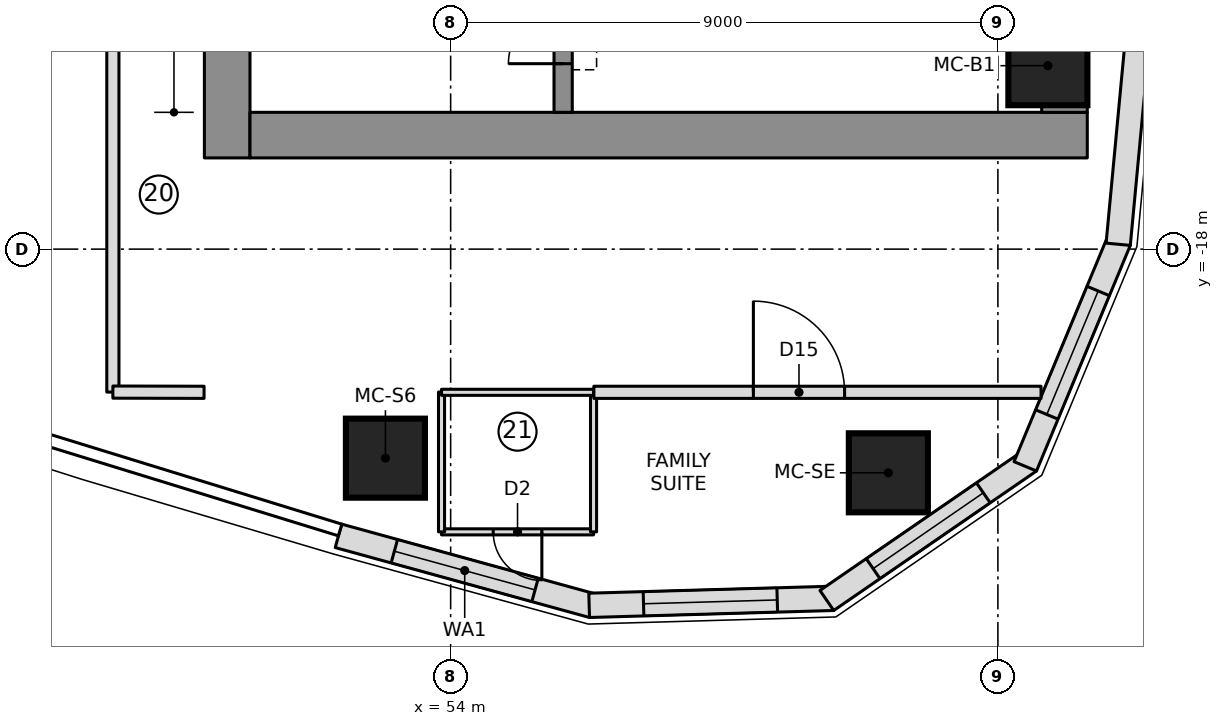
"""IFC4 building model, lengths in metres.
Left out: names, types, materials, properties, quantities, classifications, styles, units other than length and angle.
Written with IfcOpenShell. Run it as: python <this file> out.ifc"""

import sys

from ifc_helpers import new_model, si_unit, direction, frame, frame_2d, origin, origin_2d, place, context, subcontext, project, spatial, polyline, rectangle, outline, extrude, element, fill, save


model = new_model("IFC4")
c1 = context("Model", 3, precision=1e-05, world=origin(), true_north=direction((0.0, 1.0)))
c2 = subcontext(c1, "Body", "Model", "MODEL_VIEW")
j1 = project(units=[si_unit("LENGTHUNIT", "METRE"), si_unit("PLANEANGLEUNIT", "RADIAN")], contexts=[c1])
p1 = place(None, origin())
s1 = spatial("IfcSite", under=j1, at=p1, CompositionType="ELEMENT")
p2 = place(p1, origin())
s2 = spatial("IfcBuilding", under=s1, at=p2, CompositionType="ELEMENT")
p3 = place(p2, frame((0.0, 0.0, 200.35)))
s3 = spatial("IfcBuildingStorey", under=s2, at=p3, CompositionType="ELEMENT", Elevation=200.35)
p4 = place(p3, frame((50.325, -16.5, 0.0), z_axis=(0.0, 0.0, 1.0), x_axis=(0.0, 1.0, 0.0)))
e1 = element("IfcWall", 1, at=p4, inside=s3, PredefinedType="SHEAR", context=c2, shape_type="SweptSolid", body=[
    extrude(rectangle(XDim=9.85, YDim=0.75, at=frame_2d((4.925, 0.0))), origin(), (0.0, 0.0, 1.0), 3.55),
])
p5 = place(p4, frame((2.25, 0.0, 0.0)))
e2 = element("IfcOpeningElement", 2, at=p5, cuts=e1, PredefinedType="OPENING", context=c2, shape_type="SweptSolid", body=[
    extrude(rectangle(XDim=1.1, YDim=2.1, at=frame_2d((0.55, 1.05))), frame((0.0, 0.385, 0.0), z_axis=(0.0, -1.0, 0.0), x_axis=(1.0, 0.0, 0.0)), (0.0, 0.0, 1.0), 0.77),
])
p6 = place(p3, frame((50.7, -16.125, 0.0), z_axis=(0.0, 0.0, 1.0), x_axis=(1.0, 0.0, 0.0)))
e3 = element("IfcWall", 3, at=p6, inside=s3, PredefinedType="SHEAR", context=c2, shape_type="SweptSolid", body=[
    extrude(rectangle(XDim=13.77, YDim=0.75, at=frame_2d((6.885, 0.0))), origin(), (0.0, 0.0, 1.0), 3.55),
])
p7 = place(p3, frame((64.095, -15.75, 0.0), z_axis=(0.0, 0.0, 1.0), x_axis=(0.0, 1.0, 0.0)))
e4 = element("IfcWall", 4, at=p7, inside=s3, PredefinedType="SHEAR", context=c2, shape_type="SweptSolid", body=[
    extrude(rectangle(XDim=7.651, YDim=0.75, at=frame_2d((3.825, 0.0))), origin(), (0.0, 0.0, 1.0), 3.55),
])
p8 = place(p3, frame((55.85, -15.75, 0.0), z_axis=(0.0, 0.0, 1.0), x_axis=(0.0, 1.0, 0.0)))
e5 = element("IfcWall", 5, at=p8, inside=s3, PredefinedType="SHEAR", context=c2, shape_type="SweptSolid", body=[
    extrude(rectangle(XDim=5.4, YDim=0.3, at=frame_2d((2.7, 0.0))), origin(), (0.0, 0.0, 1.0), 3.55),
])
p9 = place(p8, frame((3.6, 0.0, 0.0)))
e6 = element("IfcOpeningElement", 6, at=p9, cuts=e5, PredefinedType="OPENING", context=c2, shape_type="SweptSolid", body=[
    extrude(rectangle(XDim=1.1, YDim=2.1, at=frame_2d((0.55, 1.05))), frame((0.0, 0.16, 0.0), z_axis=(0.0, -1.0, 0.0), x_axis=(1.0, 0.0, 0.0)), (0.0, 0.0, 1.0), 0.32),
])
p10 = place(p8, frame((0.8, 0.0, 0.0)))
e7 = element("IfcOpeningElement", 7, at=p10, cuts=e5, PredefinedType="OPENING", context=c2, shape_type="SweptSolid", body=[
    extrude(rectangle(XDim=0.9, YDim=2.1, at=frame_2d((0.45, 1.05))), frame((0.0, 0.16, 0.0), z_axis=(0.0, -1.0, 0.0), x_axis=(1.0, 0.0, 0.0)), (0.0, 0.0, 1.0), 0.32),
])
for number, where, z_axis, x_axis in (
    (8, (52.927, -21.438, 0.0), (0.0, 0.0, 1.0), (1.0, 0.0, 0.0)),
    (9, (61.198, -21.679, 0.0), (0.0, 0.0, 1.0), (1.0, 0.0, 0.0)),
    (10, (63.822, -14.983, 0.0), (0.0, 0.0, 1.0), (1.0, 0.0, 0.0)),
):
    element("IfcColumn", number, at=place(p3, frame(where, z_axis=z_axis, x_axis=x_axis)), inside=s3, PredefinedType="COLUMN", context=c2, shape_type="SweptSolid", body=[
        extrude(rectangle(XDim=1.3, YDim=1.3, at=origin_2d()), origin(), (0.0, 0.0, 1.0), 3.55),
    ])
p11 = place(p3, frame((52.155, -22.716, 0.0), z_axis=(0.0, 0.0, 1.0), x_axis=(0.964205755089, -0.265155165617, 0.0)))
e11 = element("IfcWall", 11, at=p11, inside=s3, PredefinedType="NOTDEFINED", context=c2, shape_type="SweptSolid", body=[
    extrude(outline(polyline([(0.0, -0.2), (4.337, -0.2), (4.277, 0.2), (0.0, 0.2), (0.0, -0.2)])), origin(), (0.0, 0.0, 1.0), 3.25),
])
p12 = place(p11, frame((0.954, 0.0, 0.5)))
e12 = element("IfcOpeningElement", 12, at=p12, cuts=e11, PredefinedType="OPENING", context=c2, shape_type="SweptSolid", body=[
    extrude(rectangle(XDim=2.4, YDim=2.0, at=frame_2d((1.2, 1.0))), frame((0.0, 0.21, 0.0), z_axis=(0.0, -1.0, 0.0), x_axis=(1.0, 0.0, 0.0)), (0.0, 0.0, 1.0), 0.42),
])
p13 = place(p3, frame((56.308, -23.858, 0.0), z_axis=(0.0, 0.0, 1.0), x_axis=(0.999587920197, 0.028705222472, 0.0)))
e13 = element("IfcWall", 13, at=p13, inside=s3, PredefinedType="NOTDEFINED", context=c2, shape_type="SweptSolid", body=[
    extrude(outline(polyline([(-0.03, -0.2), (3.989, -0.2), (3.87, 0.2), (0.03, 0.2), (-0.03, -0.2)])), origin(), (0.0, 0.0, 1.0), 3.25),
])
p14 = place(p13, frame((0.865, 0.0, 0.6)))
e14 = element("IfcOpeningElement", 14, at=p14, cuts=e13, PredefinedType="OPENING", context=c2, shape_type="SweptSolid", body=[
    extrude(outline(polyline([(0.0, 1.35), (0.084, 1.771), (0.322, 2.128), (0.679, 2.366), (1.1, 2.45), (1.521, 2.366), (1.878, 2.128), (2.116, 1.771), (2.2, 1.35), (2.2, 1.1), (2.116, 0.679), (1.878, 0.322), (1.521, 0.084), (1.1, 0.0), (0.679, 0.084), (0.322, 0.322), (0.084, 0.679), (0.0, 1.1), (0.0, 1.35)])), frame((0.0, 0.21, 0.0), z_axis=(0.0, -1.0, 0.0), x_axis=(1.0, 0.0, 0.0)), (0.0, 0.0, 1.0), 0.42),
])
p15 = place(p3, frame((60.236, -23.745, 0.0), z_axis=(0.0, 0.0, 1.0), x_axis=(0.823806162588, 0.566871596115, 0.0)))
e15 = element("IfcWall", 15, at=p15, inside=s3, PredefinedType="NOTDEFINED", context=c2, shape_type="SweptSolid", body=[
    extrude(outline(polyline([(-0.059, -0.2), (3.988, -0.2), (3.87, 0.2), (0.059, 0.2), (-0.059, -0.2)])), origin(), (0.0, 0.0, 1.0), 3.25),
])
p16 = place(p15, frame((0.865, 0.0, 0.6)))
e16 = element("IfcOpeningElement", 16, at=p16, cuts=e15, PredefinedType="OPENING", context=c2, shape_type="SweptSolid", body=[
    extrude(outline(polyline([(0.0, 1.35), (0.084, 1.771), (0.322, 2.128), (0.679, 2.366), (1.1, 2.45), (1.521, 2.366), (1.878, 2.128), (2.116, 1.771), (2.2, 1.35), (2.2, 1.1), (2.116, 0.679), (1.878, 0.322), (1.521, 0.084), (1.1, 0.0), (0.679, 0.084), (0.322, 0.322), (0.084, 0.679), (0.0, 1.1), (0.0, 1.35)])), frame((0.0, 0.21, 0.0), z_axis=(0.0, -1.0, 0.0), x_axis=(1.0, 0.0, 0.0)), (0.0, 0.0, 1.0), 0.42),
])
p17 = place(p3, frame((63.472, -21.518, 0.0), z_axis=(0.0, 0.0, 1.0), x_axis=(0.383997619794, 0.923334082547, 0.0)))
e17 = element("IfcWall", 17, at=p17, inside=s3, PredefinedType="NOTDEFINED", context=c2, shape_type="SweptSolid", body=[
    extrude(outline(polyline([(-0.059, -0.2), (3.959, -0.2), (3.899, 0.2), (0.059, 0.2), (-0.059, -0.2)])), origin(), (0.0, 0.0, 1.0), 3.25),
])
p18 = place(p17, frame((0.865, 0.0, 0.6)))
e18 = element("IfcOpeningElement", 18, at=p18, cuts=e17, PredefinedType="OPENING", context=c2, shape_type="SweptSolid", body=[
    extrude(outline(polyline([(0.0, 1.35), (0.084, 1.771), (0.322, 2.128), (0.679, 2.366), (1.1, 2.45), (1.521, 2.366), (1.878, 2.128), (2.116, 1.771), (2.2, 1.35), (2.2, 1.1), (2.116, 0.679), (1.878, 0.322), (1.521, 0.084), (1.1, 0.0), (0.679, 0.084), (0.322, 0.322), (0.084, 0.679), (0.0, 1.1), (0.0, 1.35)])), frame((0.0, 0.21, 0.0), z_axis=(0.0, -1.0, 0.0), x_axis=(1.0, 0.0, 0.0)), (0.0, 0.0, 1.0), 0.42),
])
p19 = place(p3, frame((64.981, -17.89, 0.0), z_axis=(0.0, 0.0, 1.0), x_axis=(0.093605694738, 0.995609348044, 0.0)))
e19 = element("IfcWall", 19, at=p19, inside=s3, PredefinedType="NOTDEFINED", context=c2, shape_type="SweptSolid", body=[
    extrude(outline(polyline([(-0.03, -0.2), (4.484, -0.2), (4.478, 0.2), (0.03, 0.2), (-0.03, -0.2)])), origin(), (0.0, 0.0, 1.0), 3.25),
])
p20 = place(p19, frame((3.189, 0.0, 0.5)))
e20 = element("IfcOpeningElement", 20, at=p20, cuts=e19, PredefinedType="OPENING", context=c2, shape_type="SweptSolid", body=[
    extrude(rectangle(XDim=1.0, YDim=2.0, at=frame_2d((0.5, 1.0))), frame((0.0, 0.21, 0.0), z_axis=(0.0, -1.0, 0.0), x_axis=(1.0, 0.0, 0.0)), (0.0, 0.0, 1.0), 0.42),
])
p21 = place(p3, frame((56.35, -22.65, 0.0), z_axis=(0.0, 0.0, 1.0), x_axis=(-1.0, 0.0, 0.0)))
e21 = element("IfcWall", 21, at=p21, inside=s3, PredefinedType="PARTITIONING", context=c2, shape_type="SweptSolid", body=[
    extrude(rectangle(XDim=2.5, YDim=0.1, at=frame_2d((1.25, 0.0))), origin(), (0.0, 0.0, 1.0), 3.25),
])
p22 = place(p21, frame((0.85, 0.0, 0.0)))
e22 = element("IfcOpeningElement", 22, at=p22, cuts=e21, PredefinedType="OPENING", context=c2, shape_type="SweptSolid", body=[
    extrude(rectangle(XDim=0.8, YDim=2.1, at=frame_2d((0.4, 1.05))), frame((0.0, 0.06, 0.0), z_axis=(0.0, -1.0, 0.0), x_axis=(1.0, 0.0, 0.0)), (0.0, 0.0, 1.0), 0.12),
])
for number, where, z_axis, x_axis in (
    (23, (53.85, -22.65, 0.0), (0.0, 0.0, 1.0), (0.0, 1.0, 0.0)),
    (24, (56.35, -20.35, 0.0), (0.0, 0.0, 1.0), (0.0, -1.0, 0.0)),
):
    element("IfcWall", number, at=place(p3, frame(where, z_axis=z_axis, x_axis=x_axis)), inside=s3, PredefinedType="PARTITIONING", context=c2, shape_type="SweptSolid", body=[
        extrude(rectangle(XDim=2.3, YDim=0.1, at=frame_2d((1.15, 0.0))), origin(), (0.0, 0.0, 1.0), 3.25),
    ])
p23 = place(p3, frame((56.355, -20.355, 0.0), z_axis=(0.0, 0.0, 1.0), x_axis=(1.0, 0.0, 0.0)))
e25 = element("IfcWall", 25, at=p23, inside=s3, PredefinedType="PARTITIONING", context=c2, shape_type="SweptSolid", body=[
    extrude(rectangle(XDim=7.354, YDim=0.2, at=frame_2d((3.677, 0.0))), origin(), (0.0, 0.0, 1.0), 3.25),
])
p24 = place(p23, frame((2.624, 0.0, 0.0)))
e26 = element("IfcOpeningElement", 26, at=p24, cuts=e25, PredefinedType="OPENING", context=c2, shape_type="SweptSolid", body=[
    extrude(rectangle(XDim=1.5, YDim=2.1, at=frame_2d((0.75, 1.05))), frame((0.0, 0.11, 0.0), z_axis=(0.0, -1.0, 0.0), x_axis=(1.0, 0.0, 0.0)), (0.0, 0.0, 1.0), 0.22),
])
p25 = place(p3, frame((53.85, -20.355, 0.0), z_axis=(0.0, 0.0, 1.0), x_axis=(1.0, 0.0, 0.0)))
e27 = element("IfcWall", 27, at=p25, inside=s3, PredefinedType="PARTITIONING", context=c2, shape_type="SweptSolid", body=[
    extrude(rectangle(XDim=2.5, YDim=0.1, at=frame_2d((1.25, 0.0))), origin(), (0.0, 0.0, 1.0), 3.25),
])
p26 = place(p3, frame((48.445, -13.415, 0.0), z_axis=(0.0, 0.0, 1.0), x_axis=(3.5195157e-05, -0.999999999381, 0.0)))
e28 = element("IfcWall", 28, at=p26, inside=s3, PredefinedType="PARTITIONING", context=c2, shape_type="SweptSolid", body=[
    extrude(rectangle(XDim=6.937, YDim=0.2, at=frame_2d((3.468, 0.0))), origin(), (0.0, 0.0, 1.0), 3.25),
])
p27 = place(p3, frame((48.445, -20.352, 0.0), z_axis=(0.0, 0.0, 1.0), x_axis=(0.999997403051, -0.002279010849, 0.0)))
e29 = element("IfcWall", 29, at=p27, inside=s3, PredefinedType="PARTITIONING", context=c2, shape_type="SweptSolid", body=[
    extrude(rectangle(XDim=1.5, YDim=0.2, at=frame_2d((0.75, 0.0))), origin(), (0.0, 0.0, 1.0), 3.25),
])
p28 = place(p12, origin())
e30 = element("IfcWindow", 30, at=p28, inside=s3, PartitioningType="SINGLE_PANEL", PredefinedType="WINDOW", context=c2, shape_type="SweptSolid", body=[
    extrude(rectangle(XDim=2.4, YDim=2.0, at=frame_2d((1.2, 1.0))), frame((0.0, 0.17, 0.0), z_axis=(0.0, -1.0, 0.0), x_axis=(1.0, 0.0, 0.0)), (0.0, 0.0, 1.0), 0.06),
])
fill(e12, e30)
p29 = place(p14, origin())
e31 = element("IfcWindow", 31, at=p29, inside=s3, PartitioningType="SINGLE_PANEL", PredefinedType="WINDOW", context=c2, shape_type="SweptSolid", body=[
    extrude(outline(polyline([(0.0, 1.35), (0.084, 1.771), (0.322, 2.128), (0.679, 2.366), (1.1, 2.45), (1.521, 2.366), (1.878, 2.128), (2.116, 1.771), (2.2, 1.35), (2.2, 1.1), (2.116, 0.679), (1.878, 0.322), (1.521, 0.084), (1.1, 0.0), (0.679, 0.084), (0.322, 0.322), (0.084, 0.679), (0.0, 1.1), (0.0, 1.35)])), frame((0.0, 0.17, 0.0), z_axis=(0.0, -1.0, 0.0), x_axis=(1.0, 0.0, 0.0)), (0.0, 0.0, 1.0), 0.06),
])
fill(e14, e31)
p30 = place(p16, origin())
e32 = element("IfcWindow", 32, at=p30, inside=s3, PartitioningType="SINGLE_PANEL", PredefinedType="WINDOW", context=c2, shape_type="SweptSolid", body=[
    extrude(outline(polyline([(0.0, 1.35), (0.084, 1.771), (0.322, 2.128), (0.679, 2.366), (1.1, 2.45), (1.521, 2.366), (1.878, 2.128), (2.116, 1.771), (2.2, 1.35), (2.2, 1.1), (2.116, 0.679), (1.878, 0.322), (1.521, 0.084), (1.1, 0.0), (0.679, 0.084), (0.322, 0.322), (0.084, 0.679), (0.0, 1.1), (0.0, 1.35)])), frame((0.0, 0.17, 0.0), z_axis=(0.0, -1.0, 0.0), x_axis=(1.0, 0.0, 0.0)), (0.0, 0.0, 1.0), 0.06),
])
fill(e16, e32)
p31 = place(p18, origin())
e33 = element("IfcWindow", 33, at=p31, inside=s3, PartitioningType="SINGLE_PANEL", PredefinedType="WINDOW", context=c2, shape_type="SweptSolid", body=[
    extrude(outline(polyline([(0.0, 1.35), (0.084, 1.771), (0.322, 2.128), (0.679, 2.366), (1.1, 2.45), (1.521, 2.366), (1.878, 2.128), (2.116, 1.771), (2.2, 1.35), (2.2, 1.1), (2.116, 0.679), (1.878, 0.322), (1.521, 0.084), (1.1, 0.0), (0.679, 0.084), (0.322, 0.322), (0.084, 0.679), (0.0, 1.1), (0.0, 1.35)])), frame((0.0, 0.17, 0.0), z_axis=(0.0, -1.0, 0.0), x_axis=(1.0, 0.0, 0.0)), (0.0, 0.0, 1.0), 0.06),
])
fill(e18, e33)
p32 = place(p22, origin())
e34 = element("IfcDoor", 34, at=p32, inside=s3, OperationType="SINGLE_SWING_LEFT", PredefinedType="DOOR", context=c2, shape_type="SweptSolid", body=[
    extrude(rectangle(XDim=0.8, YDim=2.1, at=frame_2d((0.4, 1.05))), frame((0.0, 0.025, 0.0), z_axis=(0.0, -1.0, 0.0), x_axis=(1.0, 0.0, 0.0)), (0.0, 0.0, 1.0), 0.05),
])
fill(e22, e34)
p33 = place(p24, origin())
e35 = element("IfcDoor", 35, at=p33, inside=s3, OperationType="DOUBLE_DOOR_SINGLE_SWING", PredefinedType="DOOR", context=c2, shape_type="SweptSolid", body=[
    extrude(rectangle(XDim=1.5, YDim=2.1, at=frame_2d((0.75, 1.05))), frame((0.0, 0.025, 0.0), z_axis=(0.0, -1.0, 0.0), x_axis=(1.0, 0.0, 0.0)), (0.0, 0.0, 1.0), 0.05),
])
fill(e26, e35)
p34 = place(p10, origin())
e36 = element("IfcDoor", 36, at=p34, inside=s3, OperationType="SINGLE_SWING_LEFT", PredefinedType="DOOR", context=c2, shape_type="SweptSolid", body=[
    extrude(rectangle(XDim=0.9, YDim=2.1, at=frame_2d((0.45, 1.05))), frame((0.0, 0.025, 0.0), z_axis=(0.0, -1.0, 0.0), x_axis=(1.0, 0.0, 0.0)), (0.0, 0.0, 1.0), 0.05),
])
fill(e7, e36)
save(model, sys.argv[1])
